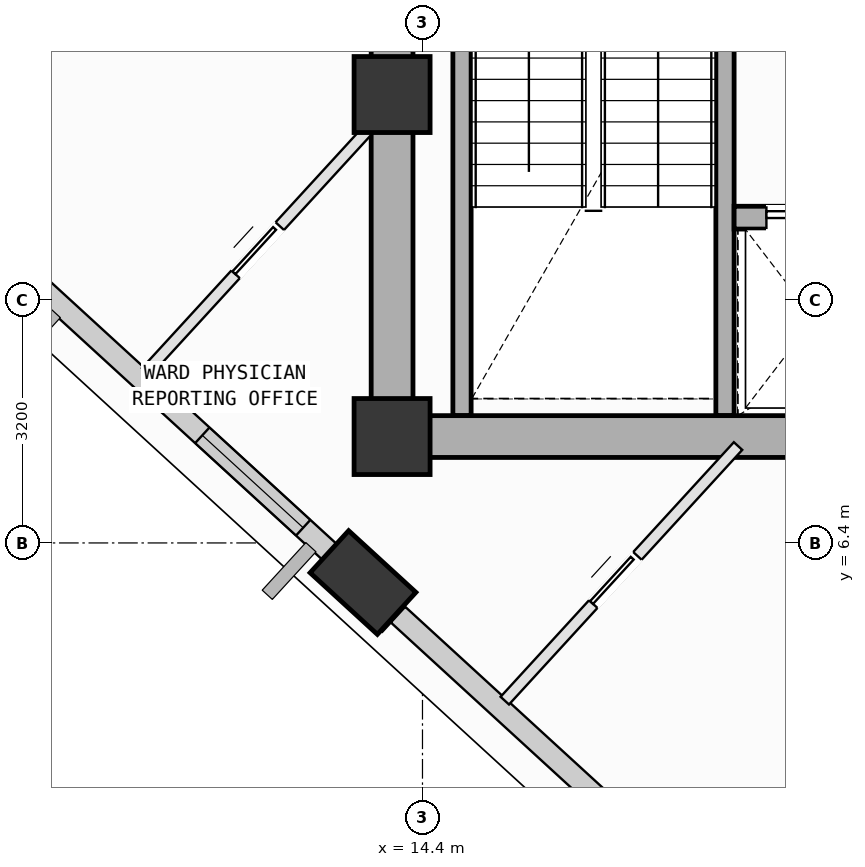
"""IFC4 building model, lengths in metres.
Left out: names, types, materials, properties, quantities, classifications, styles, units other than length and angle.
Written with IfcOpenShell. Run it as: python <this file> out.ifc"""

import sys

from ifc_helpers import new_model, si_unit, direction, frame, frame_2d, origin, origin_2d, place, context, subcontext, project, spatial, rectangle, extrude, element, fill, save


model = new_model("IFC4")
c1 = context("Model", 3, precision=1e-05, world=origin(), true_north=direction((0.0, 1.0)))
c2 = subcontext(c1, "Body", "Model", "MODEL_VIEW")
j1 = project(units=[si_unit("LENGTHUNIT", "METRE"), si_unit("PLANEANGLEUNIT", "RADIAN")], contexts=[c1])
p1 = place(None, origin())
s1 = spatial("IfcSite", under=j1, at=p1, CompositionType="ELEMENT")
p2 = place(p1, origin())
s2 = spatial("IfcBuilding", under=s1, at=p2, CompositionType="ELEMENT")
p3 = place(p2, frame((0.0, 0.0, 227.2)))
s3 = spatial("IfcBuildingStorey", under=s2, at=p3, CompositionType="ELEMENT", Elevation=227.2)
for number, where, z_axis, x_axis in (
    (1, (14.0, 7.8, 0.0), (0.0, 0.0, 1.0), (1.0, 0.0, 0.0)),
    (2, (14.0, 12.3, 0.0), (0.0, 0.0, 1.0), (1.0, 0.0, 0.0)),
):
    element("IfcColumn", number, at=place(p3, frame(where, z_axis=z_axis, x_axis=x_axis)), inside=s3, PredefinedType="COLUMN", context=c2, shape_type="SweptSolid", body=[
        extrude(rectangle(XDim=1.0, YDim=1.0, at=origin_2d()), origin(), (0.0, 0.0, 1.0), 4.0),
    ])
p4 = place(p3, frame((8.715, 10.372, 0.002), z_axis=(0.060236868527, -0.101911318354, 0.992968077463), x_axis=(-0.976041693213, 0.202351506384, 0.07997800306)))
e3 = element("IfcColumn", 3, at=p4, inside=s3, PredefinedType="COLUMN", context=c2, shape_type="SweptSolid", body=[
    extrude(rectangle(XDim=1.2, YDim=0.75, at=origin_2d()), origin(), (0.0, 0.0, 1.0), 4.025),
])
p5 = place(p3, frame((13.617, 5.879, 0.002), z_axis=(0.078603281335, -0.081638157062, 0.993557615579), x_axis=(-0.996676276497, -0.027828937026, 0.076563373313)))
e4 = element("IfcColumn", 4, at=p5, inside=s3, PredefinedType="COLUMN", context=c2, shape_type="SweptSolid", body=[
    extrude(rectangle(XDim=1.2, YDim=0.75, at=origin_2d()), origin(), (0.0, 0.0, 1.0), 4.022),
])
p6 = place(p3, frame((13.492, 5.994, 0.0), z_axis=(0.0, 0.0, 1.0), x_axis=(-0.73726134104, 0.675607663521, 0.0)))
e5 = element("IfcWall", 5, at=p6, inside=s3, PredefinedType="SOLIDWALL", context=c2, shape_type="SweptSolid", body=[
    extrude(rectangle(XDim=5.861, YDim=0.28, at=frame_2d((2.93, 0.0))), origin(), (0.0, 0.0, 1.0), 3.165),
])
p7 = place(p6, frame((0.898, 0.0, 0.75)))
e6 = element("IfcOpeningElement", 6, at=p7, cuts=e5, PredefinedType="OPENING", context=c2, shape_type="SweptSolid", body=[
    extrude(rectangle(XDim=1.8, YDim=2.05, at=frame_2d((0.9, 1.025))), frame((0.0, 0.15, 0.0), z_axis=(0.0, -1.0, 0.0), x_axis=(1.0, 0.0, 0.0)), (0.0, 0.0, 1.0), 0.3),
])
p8 = place(p3, frame((19.651, 0.351, 0.0), z_axis=(0.0, 0.0, 1.0), x_axis=(-0.737296247066, 0.675569570113, 0.0)))
e7 = element("IfcWall", 7, at=p8, inside=s3, PredefinedType="SOLIDWALL", context=c2, shape_type="SweptSolid", body=[
    extrude(rectangle(XDim=7.558, YDim=0.28, at=frame_2d((3.779, 0.0))), origin(), (0.0, 0.0, 1.0), 3.265),
])
p9 = place(p8, frame((2.175, 0.0, 0.75)))
e8 = element("IfcOpeningElement", 8, at=p9, cuts=e7, PredefinedType="OPENING", context=c2, shape_type="SweptSolid", body=[
    extrude(rectangle(XDim=1.2, YDim=1.75, at=frame_2d((0.6, 0.875))), frame((0.0, 0.15, 0.0), z_axis=(0.0, -1.0, 0.0), x_axis=(1.0, 0.0, 0.0)), (0.0, 0.0, 1.0), 0.3),
])
for number, where, z_axis, x_axis in (
    (9, (18.38, 15.12, 0.0), (0.0, 0.0, 1.0), (0.0, -1.0, 0.0)),
    (10, (14.92, 8.075, 0.0), (0.0, 0.0, 1.0), (0.0, 1.0, 0.0)),
):
    element("IfcWall", number, at=place(p3, frame(where, z_axis=z_axis, x_axis=x_axis)), inside=s3, PredefinedType="SOLIDWALL", context=c2, shape_type="SweptSolid", body=[
        extrude(rectangle(XDim=7.045, YDim=0.24, at=frame_2d((3.522, 0.0))), origin(), (0.0, 0.0, 1.0), 3.78),
    ])
p10 = place(p3, frame((14.0, 7.8, 0.0), z_axis=(0.0, 0.0, 1.0), x_axis=(1.0, 0.0, 0.0)))
e11 = element("IfcWall", 11, at=p10, inside=s3, PredefinedType="SHEAR", context=c2, shape_type="SweptSolid", body=[
    extrude(rectangle(XDim=10.8, YDim=0.55, at=frame_2d((5.4, 0.0))), origin(), (0.0, 0.0, 1.0), 3.78),
])
p11 = place(p3, frame((14.0, 16.8, 0.0), z_axis=(0.0, 0.0, 1.0), x_axis=(0.0, -1.0, 0.0)))
e12 = element("IfcWall", 12, at=p11, inside=s3, PredefinedType="SHEAR", context=c2, shape_type="SweptSolid", body=[
    extrude(rectangle(XDim=9.0, YDim=0.55, at=frame_2d((4.5, 0.0))), origin(), (0.0, 0.0, 1.0), 3.78),
])
p12 = place(p3, frame((18.5, 10.68, 0.0), z_axis=(0.0, 0.0, 1.0), x_axis=(1.0, 0.0, 0.0)))
e13 = element("IfcWall", 13, at=p12, inside=s3, PredefinedType="SOLIDWALL", context=c2, shape_type="SweptSolid", body=[
    extrude(rectangle(XDim=5.3, YDim=0.3, at=frame_2d((2.65, 0.0))), origin(), (0.0, 0.0, 1.0), 3.78),
])
p13 = place(p12, frame((4.22, 0.0, 0.0)))
e14 = element("IfcOpeningElement", 14, at=p13, cuts=e13, PredefinedType="OPENING", context=c2, shape_type="SweptSolid", body=[
    extrude(rectangle(XDim=0.86, YDim=2.06, at=frame_2d((0.43, 1.03))), frame((0.0, 0.16, 0.0), z_axis=(0.0, -1.0, 0.0), x_axis=(1.0, 0.0, 0.0)), (0.0, 0.0, 1.0), 0.32),
])
p14 = place(p12, frame((0.425, 0.0, 0.0)))
e15 = element("IfcOpeningElement", 15, at=p14, cuts=e13, PredefinedType="OPENING", context=c2, shape_type="SweptSolid", body=[
    extrude(rectangle(XDim=1.25, YDim=2.18, at=frame_2d((0.625, 1.09))), frame((0.0, 0.16, 0.0), z_axis=(0.0, -1.0, 0.0), x_axis=(1.0, 0.0, 0.0)), (0.0, 0.0, 1.0), 0.32),
])
p15 = place(p12, frame((2.525, 0.0, 0.0)))
e16 = element("IfcOpeningElement", 16, at=p15, cuts=e13, PredefinedType="OPENING", context=c2, shape_type="SweptSolid", body=[
    extrude(rectangle(XDim=1.25, YDim=2.18, at=frame_2d((0.625, 1.09))), frame((0.0, 0.16, 0.0), z_axis=(0.0, -1.0, 0.0), x_axis=(1.0, 0.0, 0.0)), (0.0, 0.0, 1.0), 0.32),
])
p16 = place(p3, frame((15.483, 4.325, 0.0), z_axis=(0.0, 0.0, 1.0), x_axis=(0.675505602281, 0.737354854387, 0.0)))
e17 = element("IfcWall", 17, at=p16, inside=s3, PredefinedType="PARTITIONING", context=c2, shape_type="SweptSolid", body=[
    extrude(rectangle(XDim=4.543, YDim=0.15, at=frame_2d((2.272, 0.0))), origin(), (0.0, 0.0, 1.0), 3.78),
])
p17 = place(p16, frame((1.723, 0.0, 0.0)))
e18 = element("IfcOpeningElement", 18, at=p17, cuts=e17, PredefinedType="OPENING", context=c2, shape_type="SweptSolid", body=[
    extrude(rectangle(XDim=0.86, YDim=2.06, at=frame_2d((0.43, 1.03))), frame((0.0, 0.085, 0.0), z_axis=(0.0, -1.0, 0.0), x_axis=(1.0, 0.0, 0.0)), (0.0, 0.0, 1.0), 0.17),
])
p18 = place(p3, frame((13.923, 5.287, 0.0), z_axis=(0.0, 0.0, 1.0), x_axis=(-0.737447304221, 0.675404673879, 0.0)))
e19 = element("IfcWall", 19, at=p18, inside=s3, PredefinedType="PARTITIONING", context=c2, shape_type="SweptSolid", body=[
    extrude(rectangle(XDim=0.795, YDim=0.15, at=frame_2d((0.397, 0.0))), origin(), (0.0, 0.0, 1.0), 3.265),
])
p19 = place(p3, frame((10.764, 8.65, 0.0), z_axis=(0.0, 0.0, 1.0), x_axis=(0.675704273742, 0.737172798228, 0.0)))
e20 = element("IfcWall", 20, at=p19, inside=s3, PredefinedType="PARTITIONING", context=c2, shape_type="SweptSolid", body=[
    extrude(rectangle(XDim=4.345, YDim=0.15, at=frame_2d((2.173, 0.0))), origin(), (0.0, 0.0, 1.0), 3.78),
])
p20 = place(p19, frame((1.742, 0.0, 0.0)))
e21 = element("IfcOpeningElement", 21, at=p20, cuts=e20, PredefinedType="OPENING", context=c2, shape_type="SweptSolid", body=[
    extrude(rectangle(XDim=0.86, YDim=2.06, at=frame_2d((0.43, 1.03))), frame((0.0, 0.085, 0.0), z_axis=(0.0, -1.0, 0.0), x_axis=(1.0, 0.0, 0.0)), (0.0, 0.0, 1.0), 0.17),
])
p21 = place(p7, origin())
e22 = element("IfcWindow", 22, at=p21, inside=s3, PartitioningType="SINGLE_PANEL", PredefinedType="WINDOW", context=c2, shape_type="SweptSolid", body=[
    extrude(rectangle(XDim=1.8, YDim=2.05, at=frame_2d((0.9, 1.025))), frame((0.0, 0.03, 0.0), z_axis=(0.0, -1.0, 0.0), x_axis=(1.0, 0.0, 0.0)), (0.0, 0.0, 1.0), 0.06),
])
fill(e6, e22)
p22 = place(p14, origin())
e23 = element("IfcDoor", 23, at=p22, inside=s3, OperationType="DOUBLE_DOOR_SLIDING", PredefinedType="DOOR", context=c2, shape_type="SweptSolid", body=[
    extrude(rectangle(XDim=1.25, YDim=2.18, at=frame_2d((0.625, 1.09))), frame((0.0, 0.025, 0.0), z_axis=(0.0, -1.0, 0.0), x_axis=(1.0, 0.0, 0.0)), (0.0, 0.0, 1.0), 0.05),
])
fill(e15, e23)
p23 = place(p20, origin())
e24 = element("IfcDoor", 24, at=p23, inside=s3, OperationType="SLIDING_TO_LEFT", PredefinedType="DOOR", context=c2, shape_type="SweptSolid", body=[
    extrude(rectangle(XDim=0.86, YDim=2.06, at=frame_2d((0.43, 1.03))), frame((0.0, 0.025, 0.0), z_axis=(0.0, -1.0, 0.0), x_axis=(1.0, 0.0, 0.0)), (0.0, 0.0, 1.0), 0.05),
])
fill(e21, e24)
p24 = place(p17, origin())
e25 = element("IfcDoor", 25, at=p24, inside=s3, OperationType="SLIDING_TO_LEFT", PredefinedType="DOOR", context=c2, shape_type="SweptSolid", body=[
    extrude(rectangle(XDim=0.86, YDim=2.06, at=frame_2d((0.43, 1.03))), frame((0.0, 0.025, 0.0), z_axis=(0.0, -1.0, 0.0), x_axis=(1.0, 0.0, 0.0)), (0.0, 0.0, 1.0), 0.05),
])
fill(e18, e25)
save(model, sys.argv[1])
